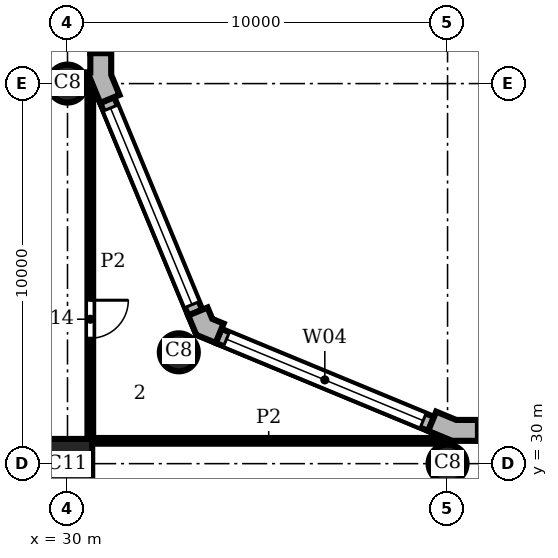
"""IFC4 building model, lengths in metres.
Left out: names, types, materials, properties, quantities, classifications, styles, units other than length and angle.
Written with IfcOpenShell. Run it as: python <this file> out.ifc"""

import sys

from ifc_helpers import new_model, si_unit, direction, frame, frame_2d, origin, origin_2d, place, context, subcontext, project, spatial, polyline, rectangle, circle, outline, extrude, element, fill, save


model = new_model("IFC4")
c1 = context("Model", 3, precision=1e-05, world=origin(), true_north=direction((0.0, 1.0)))
c2 = subcontext(c1, "Body", "Model", "MODEL_VIEW")
j1 = project(units=[si_unit("LENGTHUNIT", "METRE"), si_unit("PLANEANGLEUNIT", "RADIAN")], contexts=[c1])
p1 = place(None, origin())
s1 = spatial("IfcSite", under=j1, at=p1, CompositionType="ELEMENT")
p2 = place(p1, origin())
s2 = spatial("IfcBuilding", under=s1, at=p2, CompositionType="ELEMENT")
p3 = place(p2, frame((0.0, 0.0, 178.5)))
s3 = spatial("IfcBuildingStorey", under=s2, at=p3, CompositionType="ELEMENT", Elevation=178.5)
for number, where, z_axis, x_axis in (
    (1, (40.0, 30.0, 0.0), (0.0, 0.0, 1.0), (1.0, 0.0, 0.0)),
    (2, (32.929, 32.929, 0.0), (0.0, 0.0, 1.0), (1.0, 0.0, 0.0)),
    (3, (30.0, 40.0, 0.0), (0.0, 0.0, 1.0), (1.0, 0.0, 0.0)),
):
    element("IfcColumn", number, at=place(p3, frame(where, z_axis=z_axis, x_axis=x_axis)), inside=s3, PredefinedType="COLUMN", context=c2, shape_type="SweptSolid", body=[
        extrude(circle(Radius=0.5, at=origin_2d()), origin(), (0.0, 0.0, 1.0), 3.9),
    ])
p4 = place(p3, frame((30.0, 30.0, 0.0), z_axis=(0.0, 0.0, 1.0), x_axis=(1.0, 0.0, 0.0)))
e4 = element("IfcColumn", 4, at=p4, inside=s3, PredefinedType="COLUMN", context=c2, shape_type="SweptSolid", body=[
    extrude(rectangle(XDim=1.3, YDim=1.3, at=origin_2d()), origin(), (0.0, 0.0, 1.0), 3.9),
])
p5 = place(p3, origin())
e5 = element("IfcWall", 5, at=p5, inside=s3, PredefinedType="SOLIDWALL", context=c2, shape_type="SweptSolid", body=[
    extrude(outline(polyline([(40.8, 31.0), (40.8, 31.15), (40.229, 31.15), (39.701, 31.369), (39.644, 31.23), (39.49, 30.861), (40.119, 30.6), (40.8, 30.6), (40.8, 31.0)])), origin(), (0.0, 0.0, 1.0), 3.9),
])
e6 = element("IfcWall", 6, at=p5, inside=s3, PredefinedType="SOLIDWALL", context=c2, shape_type="SweptSolid", body=[
    extrude(outline(polyline([(34.051, 33.547), (34.108, 33.685), (33.809, 33.809), (33.685, 34.108), (33.547, 34.051), (33.177, 33.898), (33.388, 33.388), (33.898, 33.177), (34.051, 33.547)])), origin(), (0.0, 0.0, 1.0), 3.9),
])
e7 = element("IfcWall", 7, at=p5, inside=s3, PredefinedType="SOLIDWALL", context=c2, shape_type="SweptSolid", body=[
    extrude(outline(polyline([(30.62, 39.995), (30.62, 40.071), (30.861, 39.49), (31.23, 39.644), (31.369, 39.701), (31.15, 40.229), (31.15, 40.8), (31.0, 40.8), (30.6, 40.8), (30.6, 40.295), (30.5, 40.295), (30.5, 39.995), (30.62, 39.995)])), origin(), (0.0, 0.0, 1.0), 3.9),
])
p6 = place(p3, frame((59.2, 30.8, 0.0), z_axis=(0.0, 0.0, 1.0), x_axis=(-1.0, 0.0, 0.0)))
e8 = element("IfcWall", 8, at=p6, inside=s3, PredefinedType="SOLIDWALL", context=c2, shape_type="SweptSolid", body=[
    extrude(rectangle(XDim=18.4, YDim=0.4, at=frame_2d((9.2, 0.0))), origin(), (0.0, 0.0, 1.0), 3.9),
])
p7 = place(p6, frame((0.2, 0.0, 0.9)))
e9 = element("IfcOpeningElement", 9, at=p7, cuts=e8, PredefinedType="OPENING", context=c2, shape_type="SweptSolid", body=[
    extrude(rectangle(XDim=8.0, YDim=2.35, at=frame_2d((4.0, 1.175))), frame((0.0, 0.21, 0.0), z_axis=(0.0, -1.0, 0.0), x_axis=(1.0, 0.0, 0.0)), (0.0, 0.0, 1.0), 0.42),
])
p8 = place(p6, frame((10.2, 0.0, 0.9)))
e10 = element("IfcOpeningElement", 10, at=p8, cuts=e8, PredefinedType="OPENING", context=c2, shape_type="SweptSolid", body=[
    extrude(rectangle(XDim=8.0, YDim=2.35, at=frame_2d((4.0, 1.175))), frame((0.0, 0.21, 0.0), z_axis=(0.0, -1.0, 0.0), x_axis=(1.0, 0.0, 0.0)), (0.0, 0.0, 1.0), 0.42),
])
p9 = place(p3, frame((39.567, 31.045, 0.0), z_axis=(0.0, 0.0, 1.0), x_axis=(-0.923891000409, 0.382655745237, 0.0)))
e11 = element("IfcWall", 11, at=p9, inside=s3, PredefinedType="SOLIDWALL", context=c2, shape_type="SweptSolid", body=[
    extrude(rectangle(XDim=6.053, YDim=0.4, at=frame_2d((3.027, 0.0))), origin(), (0.0, 0.0, 1.0), 3.9),
])
p10 = place(p9, frame((0.227, 0.0, 0.9)))
e12 = element("IfcOpeningElement", 12, at=p10, cuts=e11, PredefinedType="OPENING", context=c2, shape_type="SweptSolid", body=[
    extrude(rectangle(XDim=5.6, YDim=2.35, at=frame_2d((2.8, 1.175))), frame((0.0, 0.21, 0.0), z_axis=(0.0, -1.0, 0.0), x_axis=(1.0, 0.0, 0.0)), (0.0, 0.0, 1.0), 0.42),
])
p11 = place(p3, frame((33.362, 33.974, 0.0), z_axis=(0.0, 0.0, 1.0), x_axis=(-0.382655745237, 0.923891000409, 0.0)))
e13 = element("IfcWall", 13, at=p11, inside=s3, PredefinedType="SOLIDWALL", context=c2, shape_type="SweptSolid", body=[
    extrude(rectangle(XDim=6.053, YDim=0.4, at=frame_2d((3.027, 0.0))), origin(), (0.0, 0.0, 1.0), 3.9),
])
p12 = place(p11, frame((0.227, 0.0, 0.9)))
e14 = element("IfcOpeningElement", 14, at=p12, cuts=e13, PredefinedType="OPENING", context=c2, shape_type="SweptSolid", body=[
    extrude(rectangle(XDim=5.6, YDim=2.35, at=frame_2d((2.8, 1.175))), frame((0.0, 0.21, 0.0), z_axis=(0.0, -1.0, 0.0), x_axis=(1.0, 0.0, 0.0)), (0.0, 0.0, 1.0), 0.42),
])
p13 = place(p3, frame((30.8, 40.8, 0.0), z_axis=(0.0, 0.0, 1.0), x_axis=(0.0, 1.0, 0.0)))
e15 = element("IfcWall", 15, at=p13, inside=s3, PredefinedType="SOLIDWALL", context=c2, shape_type="SweptSolid", body=[
    extrude(rectangle(XDim=18.4, YDim=0.4, at=frame_2d((9.2, 0.0))), origin(), (0.0, 0.0, 1.0), 3.9),
])
p14 = place(p13, frame((0.2, 0.0, 0.9)))
e16 = element("IfcOpeningElement", 16, at=p14, cuts=e15, PredefinedType="OPENING", context=c2, shape_type="SweptSolid", body=[
    extrude(rectangle(XDim=8.0, YDim=2.35, at=frame_2d((4.0, 1.175))), frame((0.0, 0.21, 0.0), z_axis=(0.0, -1.0, 0.0), x_axis=(1.0, 0.0, 0.0)), (0.0, 0.0, 1.0), 0.42),
])
p15 = place(p13, frame((10.2, 0.0, 0.9)))
e17 = element("IfcOpeningElement", 17, at=p15, cuts=e15, PredefinedType="OPENING", context=c2, shape_type="SweptSolid", body=[
    extrude(rectangle(XDim=8.0, YDim=2.35, at=frame_2d((4.0, 1.175))), frame((0.0, 0.21, 0.0), z_axis=(0.0, -1.0, 0.0), x_axis=(1.0, 0.0, 0.0)), (0.0, 0.0, 1.0), 0.42),
])
p16 = place(p3, frame((30.6, 30.65, 0.0), z_axis=(0.0, 0.0, 1.0), x_axis=(0.0, 1.0, 0.0)))
e18 = element("IfcWall", 18, at=p16, inside=s3, PredefinedType="PARTITIONING", context=c2, shape_type="SweptSolid", body=[
    extrude(rectangle(XDim=9.288, YDim=0.15, at=frame_2d((4.644, 0.0))), origin(), (0.0, 0.0, 1.0), 3.58),
])
p17 = place(p16, frame((2.65, 0.0, 0.0)))
e19 = element("IfcOpeningElement", 19, at=p17, cuts=e18, PredefinedType="OPENING", context=c2, shape_type="SweptSolid", body=[
    extrude(rectangle(XDim=1.0, YDim=2.1, at=frame_2d((0.5, 1.05))), frame((0.0, 0.085, 0.0), z_axis=(0.0, -1.0, 0.0), x_axis=(1.0, 0.0, 0.0)), (0.0, 0.0, 1.0), 0.17),
])
p18 = place(p3, frame((30.65, 30.6, 0.0), z_axis=(0.0, 0.0, 1.0), x_axis=(1.0, 0.0, 0.0)))
e20 = element("IfcWall", 20, at=p18, inside=s3, PredefinedType="PARTITIONING", context=c2, shape_type="SweptSolid", body=[
    extrude(rectangle(XDim=9.288, YDim=0.15, at=frame_2d((4.644, 0.0))), origin(), (0.0, 0.0, 1.0), 3.58),
])
p19 = place(p10, origin())
e21 = element("IfcWindow", 21, at=p19, inside=s3, PartitioningType="SINGLE_PANEL", PredefinedType="WINDOW", context=c2, shape_type="SweptSolid", body=[
    extrude(rectangle(XDim=5.6, YDim=2.35, at=frame_2d((2.8, 1.175))), frame((0.0, 0.16, 0.0), z_axis=(0.0, -1.0, 0.0), x_axis=(1.0, 0.0, 0.0)), (0.0, 0.0, 1.0), 0.06),
])
fill(e12, e21)
p20 = place(p12, origin())
e22 = element("IfcWindow", 22, at=p20, inside=s3, PartitioningType="SINGLE_PANEL", PredefinedType="WINDOW", context=c2, shape_type="SweptSolid", body=[
    extrude(rectangle(XDim=5.6, YDim=2.35, at=frame_2d((2.8, 1.175))), frame((0.0, 0.16, 0.0), z_axis=(0.0, -1.0, 0.0), x_axis=(1.0, 0.0, 0.0)), (0.0, 0.0, 1.0), 0.06),
])
fill(e14, e22)
p21 = place(p17, frame((1.0, 0.0, 0.0), z_axis=(0.0, 0.0, 1.0), x_axis=(-1.0, 0.0, 0.0)))
e23 = element("IfcDoor", 23, at=p21, inside=s3, OperationType="SINGLE_SWING_LEFT", PredefinedType="DOOR", context=c2, shape_type="SweptSolid", body=[
    extrude(rectangle(XDim=1.0, YDim=2.1, at=frame_2d((0.5, 1.05))), frame((0.0, 0.025, 0.0), z_axis=(0.0, -1.0, 0.0), x_axis=(1.0, 0.0, 0.0)), (0.0, 0.0, 1.0), 0.05),
])
fill(e19, e23)
save(model, sys.argv[1])
